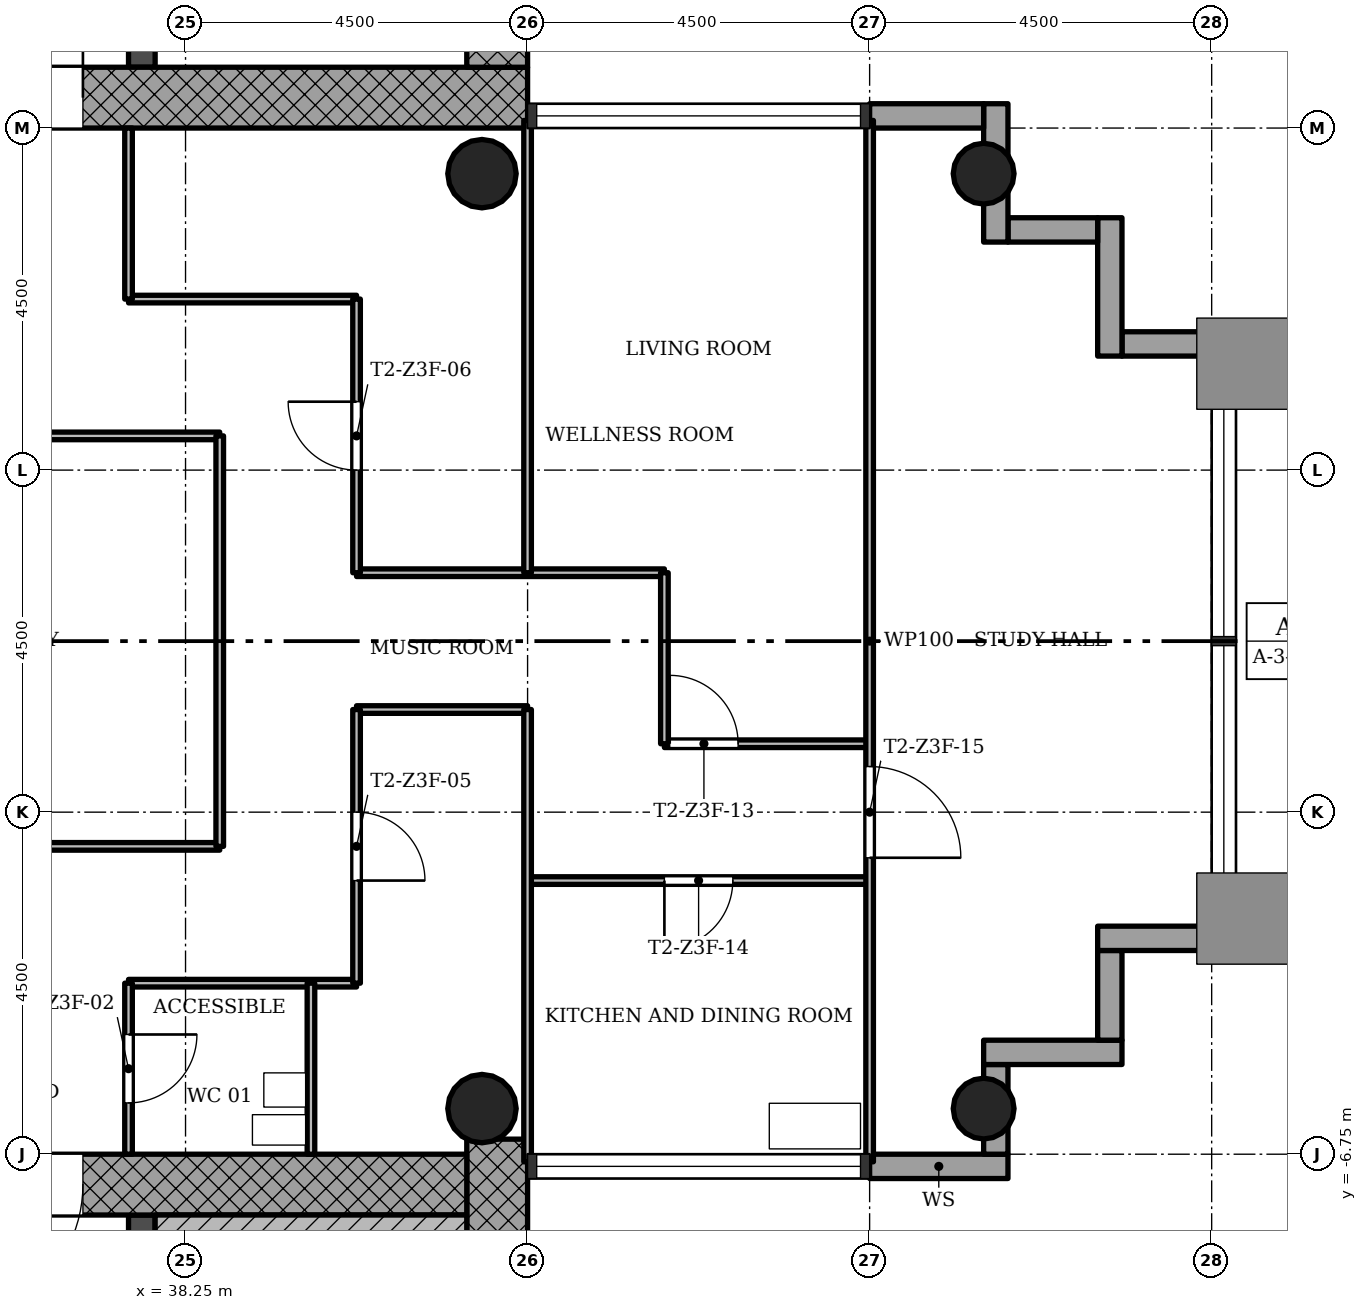
"""IFC4 building model, lengths in metres.
Left out: names, types, materials, properties, quantities, classifications, styles, units other than length and angle.
Written with IfcOpenShell. Run it as: python <this file> out.ifc"""

import sys

from ifc_helpers import new_model, si_unit, direction, frame, frame_2d, origin, origin_2d, place, context, subcontext, project, spatial, rectangle, hollow_circle, extrude, element, fill, save


model = new_model("IFC4")
c1 = context("Model", 3, precision=1e-05, world=origin(), true_north=direction((0.0, 1.0)))
c2 = subcontext(c1, "Body", "Model", "MODEL_VIEW")
j1 = project(units=[si_unit("LENGTHUNIT", "METRE"), si_unit("PLANEANGLEUNIT", "RADIAN")], contexts=[c1])
p1 = place(None, origin())
s1 = spatial("IfcSite", under=j1, at=p1, CompositionType="ELEMENT")
p2 = place(p1, origin())
s2 = spatial("IfcBuilding", under=s1, at=p2, CompositionType="ELEMENT")
p3 = place(p2, frame((0.0, 0.0, 164.3)))
s3 = spatial("IfcBuildingStorey", under=s2, at=p3, CompositionType="ELEMENT", Elevation=164.3)
p4 = place(p3, frame((30.05, 7.15, 0.0), z_axis=(0.0, 0.0, 1.0), x_axis=(1.0, 0.0, 0.0)))
e1 = element("IfcWall", 1, at=p4, inside=s3, PredefinedType="SHEAR", context=c2, shape_type="SweptSolid", body=[
    extrude(rectangle(XDim=12.7, YDim=0.8, at=frame_2d((6.35, 0.0))), origin(), (0.0, 0.0, 1.0), 3.4),
])
p5 = place(p4, frame((5.05, 0.0, 0.0)))
e2 = element("IfcOpeningElement", 2, at=p5, cuts=e1, PredefinedType="OPENING", context=c2, shape_type="SweptSolid", body=[
    extrude(rectangle(XDim=1.8, YDim=2.1, at=frame_2d((0.9, 1.05))), frame((0.0, 0.41, 0.0), z_axis=(0.0, -1.0, 0.0), x_axis=(1.0, 0.0, 0.0)), (0.0, 0.0, 1.0), 0.82),
])
p6 = place(p3, frame((42.35, 7.55, 0.0), z_axis=(0.0, 0.0, 1.0), x_axis=(0.0, 1.0, 0.0)))
e3 = element("IfcWall", 3, at=p6, inside=s3, PredefinedType="SHEAR", context=c2, shape_type="SweptSolid", body=[
    extrude(rectangle(XDim=8.2, YDim=0.8, at=frame_2d((4.1, 0.0))), origin(), (0.0, 0.0, 1.0), 3.4),
])
p7 = place(p3, frame((37.675, 7.55, 0.0), z_axis=(0.0, 0.0, 1.0), x_axis=(0.0, 1.0, 0.0)))
e4 = element("IfcWall", 4, at=p7, inside=s3, PredefinedType="SHEAR", context=c2, shape_type="SweptSolid", body=[
    extrude(rectangle(XDim=7.4, YDim=0.35, at=frame_2d((3.7, 0.0))), origin(), (0.0, 0.0, 1.0), 3.4),
])
p8 = place(p7, frame((0.95, 0.0, 0.0)))
e5 = element("IfcOpeningElement", 5, at=p8, cuts=e4, PredefinedType="OPENING", context=c2, shape_type="SweptSolid", body=[
    extrude(rectangle(XDim=1.1, YDim=2.1, at=frame_2d((0.55, 1.05))), frame((0.0, 0.185, 0.0), z_axis=(0.0, -1.0, 0.0), x_axis=(1.0, 0.0, 0.0)), (0.0, 0.0, 1.0), 0.37),
])
p9 = place(p7, frame((3.15, 0.0, 0.0)))
e6 = element("IfcOpeningElement", 6, at=p9, cuts=e4, PredefinedType="OPENING", context=c2, shape_type="SweptSolid", body=[
    extrude(rectangle(XDim=1.1, YDim=2.1, at=frame_2d((0.55, 1.05))), frame((0.0, 0.185, 0.0), z_axis=(0.0, -1.0, 0.0), x_axis=(1.0, 0.0, 0.0)), (0.0, 0.0, 1.0), 0.37),
])
p10 = place(p7, frame((5.35, 0.0, 0.0)))
e7 = element("IfcOpeningElement", 7, at=p10, cuts=e4, PredefinedType="OPENING", context=c2, shape_type="SweptSolid", body=[
    extrude(rectangle(XDim=1.1, YDim=2.1, at=frame_2d((0.55, 1.05))), frame((0.0, 0.185, 0.0), z_axis=(0.0, -1.0, 0.0), x_axis=(1.0, 0.0, 0.0)), (0.0, 0.0, 1.0), 0.37),
])
p11 = place(p3, frame((42.35, -14.95, 0.0), z_axis=(0.0, 0.0, 1.0), x_axis=(0.0, 1.0, 0.0)))
e8 = element("IfcWall", 8, at=p11, inside=s3, PredefinedType="SHEAR", context=c2, shape_type="SweptSolid", body=[
    extrude(rectangle(XDim=8.398, YDim=0.8, at=frame_2d((4.199, 0.0))), origin(), (0.0, 0.0, 1.0), 3.4),
])
p12 = place(p3, frame((41.95, -7.15, 0.0), z_axis=(0.0, 0.0, 1.0), x_axis=(-1.0, 0.0, 0.0)))
e9 = element("IfcWall", 9, at=p12, inside=s3, PredefinedType="SHEAR", context=c2, shape_type="SweptSolid", body=[
    extrude(rectangle(XDim=12.7, YDim=0.8, at=frame_2d((6.35, 0.0))), origin(), (0.0, 0.0, 1.0), 3.4),
])
p13 = place(p12, frame((5.05, 0.0, 0.0)))
e10 = element("IfcOpeningElement", 10, at=p13, cuts=e9, PredefinedType="OPENING", context=c2, shape_type="SweptSolid", body=[
    extrude(rectangle(XDim=1.8, YDim=2.1, at=frame_2d((0.9, 1.05))), frame((0.0, 0.41, 0.0), z_axis=(0.0, -1.0, 0.0), x_axis=(1.0, 0.0, 0.0)), (0.0, 0.0, 1.0), 0.82),
])
p14 = place(p3, frame((37.675, -14.95, 0.0), z_axis=(0.0, 0.0, 1.0), x_axis=(0.0, 1.0, 0.0)))
e11 = element("IfcWall", 11, at=p14, inside=s3, PredefinedType="SHEAR", context=c2, shape_type="SweptSolid", body=[
    extrude(rectangle(XDim=7.4, YDim=0.35, at=frame_2d((3.7, 0.0))), origin(), (0.0, 0.0, 1.0), 3.4),
])
p15 = place(p14, frame((5.65, 0.0, 0.0)))
e12 = element("IfcOpeningElement", 12, at=p15, cuts=e11, PredefinedType="OPENING", context=c2, shape_type="SweptSolid", body=[
    extrude(rectangle(XDim=0.9, YDim=2.1, at=frame_2d((0.45, 1.05))), frame((0.0, 0.185, 0.0), z_axis=(0.0, -1.0, 0.0), x_axis=(1.0, 0.0, 0.0)), (0.0, 0.0, 1.0), 0.37),
])
for number, where, z_axis, x_axis in (
    (13, (48.75, -6.15, 0.0), (0.0, 0.0, 1.0), (1.0, 0.0, 0.0)),
    (14, (48.75, 6.15, 0.0), (0.0, 0.0, 1.0), (1.0, 0.0, 0.0)),
):
    element("IfcColumn", number, at=place(p3, frame(where, z_axis=z_axis, x_axis=x_axis)), inside=s3, PredefinedType="COLUMN", context=c2, shape_type="SweptSolid", body=[
        extrude(hollow_circle(Radius=0.4, WallThickness=0.028, at=origin_2d()), origin(), (0.0, 0.0, 1.0), 3.4),
    ])
for number, where, z_axis, x_axis in (
    (15, (42.15, -6.15, 0.0), (0.0, 0.0, 1.0), (1.0, 0.0, 0.0)),
    (16, (42.15, 6.15, 0.0), (0.0, 0.0, 1.0), (1.0, 0.0, 0.0)),
):
    element("IfcColumn", number, at=place(p3, frame(where, z_axis=z_axis, x_axis=x_axis)), inside=s3, PredefinedType="COLUMN", context=c2, shape_type="SweptSolid", body=[
        extrude(hollow_circle(Radius=0.45, WallThickness=0.032, at=origin_2d()), origin(), (0.0, 0.0, 1.0), 3.4),
    ])
p16 = place(p3, frame((47.25, -6.91, -0.3), z_axis=(0.0, 0.0, 1.0), x_axis=(1.0, 0.0, 0.0)))
e17 = element("IfcWall", 17, at=p16, inside=s3, PredefinedType="STANDARD", context=c2, shape_type="SweptSolid", body=[
    extrude(rectangle(XDim=1.82, YDim=0.32, at=frame_2d((0.91, 0.0))), origin(), (0.0, 0.0, 1.0), 3.4),
])
p17 = place(p3, frame((48.91, -6.75, -0.3), z_axis=(0.0, 0.0, 1.0), x_axis=(0.0, 1.0, 0.0)))
e18 = element("IfcWall", 18, at=p17, inside=s3, PredefinedType="STANDARD", context=c2, shape_type="SweptSolid", body=[
    extrude(rectangle(XDim=1.18, YDim=0.32, at=frame_2d((0.59, 0.0))), origin(), (0.0, 0.0, 1.0), 3.4),
])
p18 = place(p3, frame((48.75, -5.41, -0.3), z_axis=(0.0, 0.0, 1.0), x_axis=(1.0, 0.0, 0.0)))
e19 = element("IfcWall", 19, at=p18, inside=s3, PredefinedType="STANDARD", context=c2, shape_type="SweptSolid", body=[
    extrude(rectangle(XDim=1.82, YDim=0.32, at=frame_2d((0.91, 0.0))), origin(), (0.0, 0.0, 1.0), 3.4),
])
p19 = place(p3, frame((50.41, -5.25, -0.3), z_axis=(0.0, 0.0, 1.0), x_axis=(0.0, 1.0, 0.0)))
e20 = element("IfcWall", 20, at=p19, inside=s3, PredefinedType="STANDARD", context=c2, shape_type="SweptSolid", body=[
    extrude(rectangle(XDim=1.18, YDim=0.32, at=frame_2d((0.59, 0.0))), origin(), (0.0, 0.0, 1.0), 3.4),
])
p20 = place(p3, frame((50.25, -3.91, -0.3), z_axis=(0.0, 0.0, 1.0), x_axis=(1.0, 0.0, 0.0)))
e21 = element("IfcWall", 21, at=p20, inside=s3, PredefinedType="STANDARD", context=c2, shape_type="SweptSolid", body=[
    extrude(rectangle(XDim=1.82, YDim=0.32, at=frame_2d((0.91, 0.0))), origin(), (0.0, 0.0, 1.0), 3.4),
])
p21 = place(p3, frame((52.07, 3.91, -0.3), z_axis=(0.0, 0.0, 1.0), x_axis=(-1.0, 0.0, 0.0)))
e22 = element("IfcWall", 22, at=p21, inside=s3, PredefinedType="STANDARD", context=c2, shape_type="SweptSolid", body=[
    extrude(rectangle(XDim=1.5, YDim=0.32, at=frame_2d((0.75, 0.0))), origin(), (0.0, 0.0, 1.0), 3.4),
])
p22 = place(p3, frame((50.41, 3.75, -0.3), z_axis=(0.0, 0.0, 1.0), x_axis=(0.0, 1.0, 0.0)))
e23 = element("IfcWall", 23, at=p22, inside=s3, PredefinedType="STANDARD", context=c2, shape_type="SweptSolid", body=[
    extrude(rectangle(XDim=1.82, YDim=0.32, at=frame_2d((0.91, 0.0))), origin(), (0.0, 0.0, 1.0), 3.4),
])
p23 = place(p3, frame((50.25, 5.41, -0.3), z_axis=(0.0, 0.0, 1.0), x_axis=(-1.0, 0.0, 0.0)))
e24 = element("IfcWall", 24, at=p23, inside=s3, PredefinedType="STANDARD", context=c2, shape_type="SweptSolid", body=[
    extrude(rectangle(XDim=1.18, YDim=0.32, at=frame_2d((0.59, 0.0))), origin(), (0.0, 0.0, 1.0), 3.4),
])
p24 = place(p3, frame((48.91, 5.25, -0.3), z_axis=(0.0, 0.0, 1.0), x_axis=(0.0, 1.0, 0.0)))
e25 = element("IfcWall", 25, at=p24, inside=s3, PredefinedType="STANDARD", context=c2, shape_type="SweptSolid", body=[
    extrude(rectangle(XDim=1.82, YDim=0.32, at=frame_2d((0.91, 0.0))), origin(), (0.0, 0.0, 1.0), 3.4),
])
p25 = place(p3, frame((48.75, 6.91, -0.3), z_axis=(0.0, 0.0, 1.0), x_axis=(-1.0, 0.0, 0.0)))
e26 = element("IfcWall", 26, at=p25, inside=s3, PredefinedType="STANDARD", context=c2, shape_type="SweptSolid", body=[
    extrude(rectangle(XDim=1.5, YDim=0.32, at=frame_2d((0.75, 0.0))), origin(), (0.0, 0.0, 1.0), 3.4),
])
p26 = place(p3, frame((40.5, -4.5, 0.0), z_axis=(0.0, 0.0, 1.0), x_axis=(-1.0, 0.0, 0.0)))
e27 = element("IfcWall", 27, at=p26, inside=s3, PredefinedType="PARTITIONING", context=c2, shape_type="SweptSolid", body=[
    extrude(rectangle(XDim=3.0, YDim=0.1, at=frame_2d((1.5, 0.0))), origin(), (0.0, 0.0, 1.0), 3.0),
])
p27 = place(p3, frame((47.25, -3.15, 0.0), z_axis=(0.0, 0.0, 1.0), x_axis=(-1.0, 0.0, 0.0)))
e28 = element("IfcWall", 28, at=p27, inside=s3, PredefinedType="PARTITIONING", context=c2, shape_type="SweptSolid", body=[
    extrude(rectangle(XDim=4.5, YDim=0.1, at=frame_2d((2.25, 0.0))), origin(), (0.0, 0.0, 1.0), 3.0),
])
p28 = place(p27, frame((1.8, 0.0, 0.0)))
e29 = element("IfcOpeningElement", 29, at=p28, cuts=e28, PredefinedType="OPENING", context=c2, shape_type="SweptSolid", body=[
    extrude(rectangle(XDim=0.9, YDim=2.1, at=frame_2d((0.45, 1.05))), frame((0.0, 0.06, 0.0), z_axis=(0.0, -1.0, 0.0), x_axis=(1.0, 0.0, 0.0)), (0.0, 0.0, 1.0), 0.12),
])
p29 = place(p3, frame((38.7, -2.7, 0.0), z_axis=(0.0, 0.0, 1.0), x_axis=(-1.0, 0.0, 0.0)))
e30 = element("IfcWall", 30, at=p29, inside=s3, PredefinedType="PARTITIONING", context=c2, shape_type="SweptSolid", body=[
    extrude(rectangle(XDim=5.4, YDim=0.1, at=frame_2d((2.7, 0.0))), origin(), (0.0, 0.0, 1.0), 3.0),
])
p30 = place(p3, frame((47.25, -1.35, 0.0), z_axis=(0.0, 0.0, 1.0), x_axis=(-1.0, 0.0, 0.0)))
e31 = element("IfcWall", 31, at=p30, inside=s3, PredefinedType="PARTITIONING", context=c2, shape_type="SweptSolid", body=[
    extrude(rectangle(XDim=2.7, YDim=0.1, at=frame_2d((1.35, 0.0))), origin(), (0.0, 0.0, 1.0), 3.0),
])
p31 = place(p30, frame((1.73, 0.0, 0.0)))
e32 = element("IfcOpeningElement", 32, at=p31, cuts=e31, PredefinedType="OPENING", context=c2, shape_type="SweptSolid", body=[
    extrude(rectangle(XDim=0.9, YDim=2.1, at=frame_2d((0.45, 1.05))), frame((0.0, 0.06, 0.0), z_axis=(0.0, -1.0, 0.0), x_axis=(1.0, 0.0, 0.0)), (0.0, 0.0, 1.0), 0.12),
])
p32 = place(p3, frame((42.75, -0.9, 0.0), z_axis=(0.0, 0.0, 1.0), x_axis=(-1.0, 0.0, 0.0)))
e33 = element("IfcWall", 33, at=p32, inside=s3, PredefinedType="PARTITIONING", context=c2, shape_type="SweptSolid", body=[
    extrude(rectangle(XDim=2.25, YDim=0.1, at=frame_2d((1.125, 0.0))), origin(), (0.0, 0.0, 1.0), 3.0),
])
p33 = place(p3, frame((44.55, 0.9, 0.0), z_axis=(0.0, 0.0, 1.0), x_axis=(-1.0, 0.0, 0.0)))
e34 = element("IfcWall", 34, at=p33, inside=s3, PredefinedType="PARTITIONING", context=c2, shape_type="SweptSolid", body=[
    extrude(rectangle(XDim=4.05, YDim=0.1, at=frame_2d((2.025, 0.0))), origin(), (0.0, 0.0, 1.0), 3.0),
])
p34 = place(p3, frame((38.7, 2.7, 0.0), z_axis=(0.0, 0.0, 1.0), x_axis=(-1.0, 0.0, 0.0)))
e35 = element("IfcWall", 35, at=p34, inside=s3, PredefinedType="PARTITIONING", context=c2, shape_type="SweptSolid", body=[
    extrude(rectangle(XDim=5.4, YDim=0.1, at=frame_2d((2.7, 0.0))), origin(), (0.0, 0.0, 1.0), 3.0),
])
p35 = place(p3, frame((40.5, 4.5, 0.0), z_axis=(0.0, 0.0, 1.0), x_axis=(-1.0, 0.0, 0.0)))
e36 = element("IfcWall", 36, at=p35, inside=s3, PredefinedType="PARTITIONING", context=c2, shape_type="SweptSolid", body=[
    extrude(rectangle(XDim=3.0, YDim=0.1, at=frame_2d((1.5, 0.0))), origin(), (0.0, 0.0, 1.0), 3.0),
])
p36 = place(p3, frame((47.25, -6.85, 0.0), z_axis=(0.0, 0.0, 1.0), x_axis=(0.0, 1.0, 0.0)))
e37 = element("IfcWall", 37, at=p36, inside=s3, PredefinedType="PARTITIONING", context=c2, shape_type="SweptSolid", body=[
    extrude(rectangle(XDim=13.7, YDim=0.1, at=frame_2d((6.85, 0.0))), origin(), (0.0, 0.0, 1.0), 3.0),
])
p37 = place(p36, frame((4.0, 0.0, 0.0)))
e38 = element("IfcOpeningElement", 38, at=p37, cuts=e37, PredefinedType="OPENING", context=c2, shape_type="SweptSolid", body=[
    extrude(rectangle(XDim=1.2, YDim=2.1, at=frame_2d((0.6, 1.05))), frame((0.0, 0.06, 0.0), z_axis=(0.0, -1.0, 0.0), x_axis=(1.0, 0.0, 0.0)), (0.0, 0.0, 1.0), 0.12),
])
p38 = place(p3, frame((44.55, -1.35, 0.0), z_axis=(0.0, 0.0, 1.0), x_axis=(0.0, 1.0, 0.0)))
e39 = element("IfcWall", 39, at=p38, inside=s3, PredefinedType="PARTITIONING", context=c2, shape_type="SweptSolid", body=[
    extrude(rectangle(XDim=2.25, YDim=0.1, at=frame_2d((1.125, 0.0))), origin(), (0.0, 0.0, 1.0), 3.0),
])
for number, where, z_axis, x_axis in (
    (40, (42.75, -6.85, 0.0), (0.0, 0.0, 1.0), (0.0, 1.0, 0.0)),
    (41, (42.75, 0.9, 0.0), (0.0, 0.0, 1.0), (0.0, 1.0, 0.0)),
):
    element("IfcWall", number, at=place(p3, frame(where, z_axis=z_axis, x_axis=x_axis)), inside=s3, PredefinedType="PARTITIONING", context=c2, shape_type="SweptSolid", body=[
        extrude(rectangle(XDim=5.95, YDim=0.1, at=frame_2d((2.975, 0.0))), origin(), (0.0, 0.0, 1.0), 3.0),
    ])
p39 = place(p3, frame((40.5, -4.5, 0.0), z_axis=(0.0, 0.0, 1.0), x_axis=(0.0, 1.0, 0.0)))
e42 = element("IfcWall", 42, at=p39, inside=s3, PredefinedType="PARTITIONING", context=c2, shape_type="SweptSolid", body=[
    extrude(rectangle(XDim=3.6, YDim=0.1, at=frame_2d((1.8, 0.0))), origin(), (0.0, 0.0, 1.0), 3.0),
])
p40 = place(p39, frame((1.35, 0.0, 0.0)))
e43 = element("IfcOpeningElement", 43, at=p40, cuts=e42, PredefinedType="OPENING", context=c2, shape_type="SweptSolid", body=[
    extrude(rectangle(XDim=0.9, YDim=2.1, at=frame_2d((0.45, 1.05))), frame((0.0, 0.06, 0.0), z_axis=(0.0, -1.0, 0.0), x_axis=(1.0, 0.0, 0.0)), (0.0, 0.0, 1.0), 0.12),
])
p41 = place(p3, frame((40.5, 0.9, 0.0), z_axis=(0.0, 0.0, 1.0), x_axis=(0.0, 1.0, 0.0)))
e44 = element("IfcWall", 44, at=p41, inside=s3, PredefinedType="PARTITIONING", context=c2, shape_type="SweptSolid", body=[
    extrude(rectangle(XDim=3.6, YDim=0.1, at=frame_2d((1.8, 0.0))), origin(), (0.0, 0.0, 1.0), 3.0),
])
p42 = place(p41, frame((1.35, 0.0, 0.0)))
e45 = element("IfcOpeningElement", 45, at=p42, cuts=e44, PredefinedType="OPENING", context=c2, shape_type="SweptSolid", body=[
    extrude(rectangle(XDim=0.9, YDim=2.1, at=frame_2d((0.45, 1.05))), frame((0.0, 0.06, 0.0), z_axis=(0.0, -1.0, 0.0), x_axis=(1.0, 0.0, 0.0)), (0.0, 0.0, 1.0), 0.12),
])
p43 = place(p3, frame((39.9, -6.75, 0.0), z_axis=(0.0, 0.0, 1.0), x_axis=(0.0, 1.0, 0.0)))
e46 = element("IfcWall", 46, at=p43, inside=s3, PredefinedType="PARTITIONING", context=c2, shape_type="SweptSolid", body=[
    extrude(rectangle(XDim=2.25, YDim=0.1, at=frame_2d((1.125, 0.0))), origin(), (0.0, 0.0, 1.0), 3.0),
])
p44 = place(p3, frame((38.7, -2.7, 0.0), z_axis=(0.0, 0.0, 1.0), x_axis=(0.0, 1.0, 0.0)))
e47 = element("IfcWall", 47, at=p44, inside=s3, PredefinedType="PARTITIONING", context=c2, shape_type="SweptSolid", body=[
    extrude(rectangle(XDim=5.4, YDim=0.1, at=frame_2d((2.7, 0.0))), origin(), (0.0, 0.0, 1.0), 3.0),
])
p45 = place(p3, frame((37.5, -6.75, 0.0), z_axis=(0.0, 0.0, 1.0), x_axis=(0.0, 1.0, 0.0)))
e48 = element("IfcWall", 48, at=p45, inside=s3, PredefinedType="PARTITIONING", context=c2, shape_type="SweptSolid", body=[
    extrude(rectangle(XDim=2.25, YDim=0.1, at=frame_2d((1.125, 0.0))), origin(), (0.0, 0.0, 1.0), 3.0),
])
p46 = place(p45, frame((0.675, 0.0, 0.0)))
e49 = element("IfcOpeningElement", 49, at=p46, cuts=e48, PredefinedType="OPENING", context=c2, shape_type="SweptSolid", body=[
    extrude(rectangle(XDim=0.9, YDim=2.1, at=frame_2d((0.45, 1.05))), frame((0.0, 0.06, 0.0), z_axis=(0.0, -1.0, 0.0), x_axis=(1.0, 0.0, 0.0)), (0.0, 0.0, 1.0), 0.12),
])
p47 = place(p3, frame((37.5, 4.5, 0.0), z_axis=(0.0, 0.0, 1.0), x_axis=(0.0, 1.0, 0.0)))
e50 = element("IfcWall", 50, at=p47, inside=s3, PredefinedType="PARTITIONING", context=c2, shape_type="SweptSolid", body=[
    extrude(rectangle(XDim=2.25, YDim=0.1, at=frame_2d((1.125, 0.0))), origin(), (0.0, 0.0, 1.0), 3.0),
])
p48 = place(p3, frame((37.85, -7.75, 0.0), z_axis=(0.0, 0.0, 1.0), x_axis=(1.0, 0.0, 0.0)))
e51 = element("IfcWall", 51, at=p48, inside=s3, PredefinedType="SHEAR", context=c2, shape_type="SweptSolid", body=[
    extrude(rectangle(XDim=4.1, YDim=0.4, at=frame_2d((2.05, 0.0))), origin(), (0.0, 0.0, 1.0), 3.4),
])
p49 = place(p46, origin())
e52 = element("IfcDoor", 52, at=p49, inside=s3, OperationType="SINGLE_SWING_RIGHT", PredefinedType="DOOR", context=c2, shape_type="SweptSolid", body=[
    extrude(rectangle(XDim=0.9, YDim=2.1, at=frame_2d((0.45, 1.05))), frame((0.0, 0.025, 0.0), z_axis=(0.0, -1.0, 0.0), x_axis=(1.0, 0.0, 0.0)), (0.0, 0.0, 1.0), 0.05),
])
fill(e49, e52)
p50 = place(p40, origin())
e53 = element("IfcDoor", 53, at=p50, inside=s3, OperationType="SINGLE_SWING_LEFT", PredefinedType="DOOR", context=c2, shape_type="SweptSolid", body=[
    extrude(rectangle(XDim=0.9, YDim=2.1, at=frame_2d((0.45, 1.05))), frame((0.0, 0.025, 0.0), z_axis=(0.0, -1.0, 0.0), x_axis=(1.0, 0.0, 0.0)), (0.0, 0.0, 1.0), 0.05),
])
fill(e43, e53)
p51 = place(p42, origin())
e54 = element("IfcDoor", 54, at=p51, inside=s3, OperationType="SINGLE_SWING_LEFT", PredefinedType="DOOR", context=c2, shape_type="SweptSolid", body=[
    extrude(rectangle(XDim=0.9, YDim=2.1, at=frame_2d((0.45, 1.05))), frame((0.0, 0.025, 0.0), z_axis=(0.0, -1.0, 0.0), x_axis=(1.0, 0.0, 0.0)), (0.0, 0.0, 1.0), 0.05),
])
fill(e45, e54)
p52 = place(p31, origin())
e55 = element("IfcDoor", 55, at=p52, inside=s3, OperationType="SINGLE_SWING_RIGHT", PredefinedType="DOOR", context=c2, shape_type="SweptSolid", body=[
    extrude(rectangle(XDim=0.9, YDim=2.1, at=frame_2d((0.45, 1.05))), frame((0.0, 0.025, 0.0), z_axis=(0.0, -1.0, 0.0), x_axis=(1.0, 0.0, 0.0)), (0.0, 0.0, 1.0), 0.05),
])
fill(e32, e55)
p53 = place(p28, origin())
e56 = element("IfcDoor", 56, at=p53, inside=s3, OperationType="SINGLE_SWING_LEFT", PredefinedType="DOOR", context=c2, shape_type="SweptSolid", body=[
    extrude(rectangle(XDim=0.9, YDim=2.1, at=frame_2d((0.45, 1.05))), frame((0.0, 0.025, 0.0), z_axis=(0.0, -1.0, 0.0), x_axis=(1.0, 0.0, 0.0)), (0.0, 0.0, 1.0), 0.05),
])
fill(e29, e56)
p54 = place(p37, origin())
e57 = element("IfcDoor", 57, at=p54, inside=s3, OperationType="SINGLE_SWING_LEFT", PredefinedType="DOOR", context=c2, shape_type="SweptSolid", body=[
    extrude(rectangle(XDim=1.2, YDim=2.1, at=frame_2d((0.6, 1.05))), frame((0.0, 0.025, 0.0), z_axis=(0.0, -1.0, 0.0), x_axis=(1.0, 0.0, 0.0)), (0.0, 0.0, 1.0), 0.05),
])
fill(e38, e57)
p55 = place(p5, origin())
e58 = element("IfcDoor", 58, at=p55, inside=s3, OperationType="SINGLE_SWING_LEFT", PredefinedType="DOOR", context=c2, shape_type="SweptSolid", body=[
    extrude(rectangle(XDim=1.8, YDim=2.1, at=frame_2d((0.9, 1.05))), frame((0.0, 0.025, 0.0), z_axis=(0.0, -1.0, 0.0), x_axis=(1.0, 0.0, 0.0)), (0.0, 0.0, 1.0), 0.05),
])
fill(e2, e58)
p56 = place(p13, origin())
e59 = element("IfcDoor", 59, at=p56, inside=s3, OperationType="SINGLE_SWING_LEFT", PredefinedType="DOOR", context=c2, shape_type="SweptSolid", body=[
    extrude(rectangle(XDim=1.8, YDim=2.1, at=frame_2d((0.9, 1.05))), frame((0.0, 0.025, 0.0), z_axis=(0.0, -1.0, 0.0), x_axis=(1.0, 0.0, 0.0)), (0.0, 0.0, 1.0), 0.05),
])
fill(e10, e59)
save(model, sys.argv[1])
